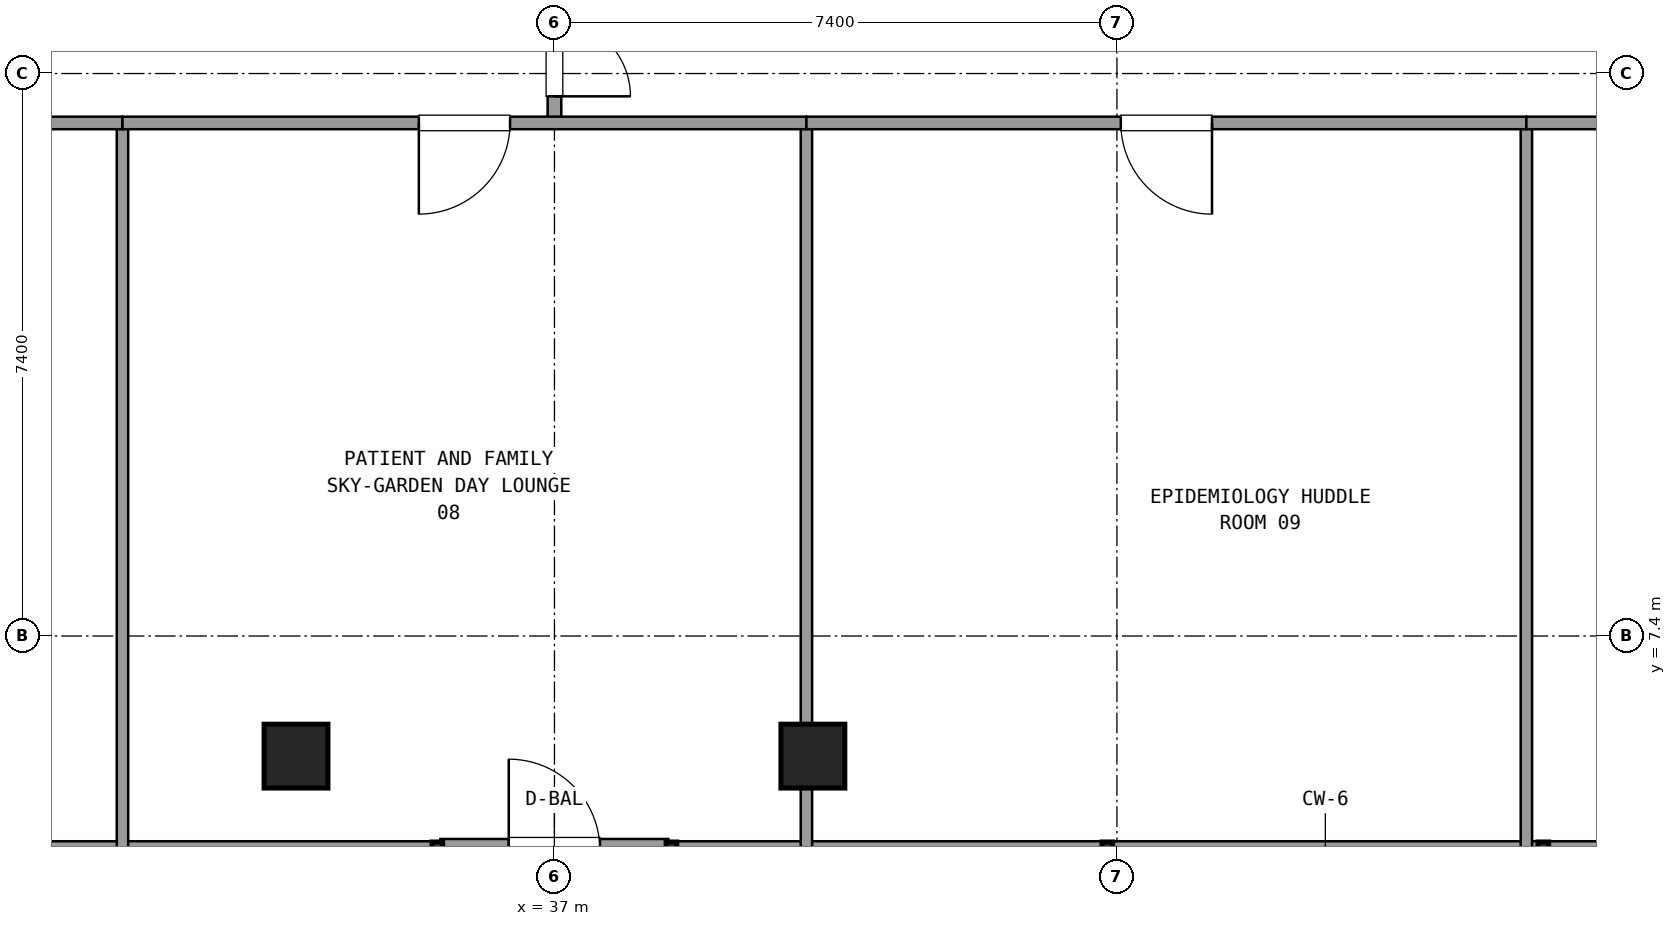
"""IFC4 building model, lengths in metres.
Left out: names, types, materials, properties, quantities, classifications, styles, units other than length and angle.
Written with IfcOpenShell. Run it as: python <this file> out.ifc"""

import sys

from ifc_helpers import new_model, si_unit, direction, frame, frame_2d, origin, origin_2d, place, context, subcontext, project, spatial, rectangle, extrude, element, fill, save


model = new_model("IFC4")
c1 = context("Model", 3, precision=1e-05, world=origin(), true_north=direction((0.0, 1.0)))
c2 = subcontext(c1, "Body", "Model", "MODEL_VIEW")
j1 = project(units=[si_unit("LENGTHUNIT", "METRE"), si_unit("PLANEANGLEUNIT", "RADIAN")], contexts=[c1])
p1 = place(None, origin())
s1 = spatial("IfcSite", under=j1, at=p1, CompositionType="ELEMENT")
p2 = place(p1, origin())
s2 = spatial("IfcBuilding", under=s1, at=p2, CompositionType="ELEMENT")
p3 = place(p2, frame((0.0, 0.0, 264.42)))
s3 = spatial("IfcBuildingStorey", under=s2, at=p3, CompositionType="ELEMENT", Elevation=264.42)
for number, where, z_axis, x_axis in (
    (1, (33.6, 5.82, 0.0), (0.0, 0.0, 1.0), (1.0, 0.0, 0.0)),
    (2, (40.4, 5.82, 0.0), (0.0, 0.0, 1.0), (1.0, 0.0, 0.0)),
):
    element("IfcColumn", number, at=place(p3, frame(where, z_axis=z_axis, x_axis=x_axis)), inside=s3, PredefinedType="COLUMN", context=c2, shape_type="SweptSolid", body=[
        extrude(rectangle(XDim=0.84, YDim=0.84, at=origin_2d()), origin(), (0.0, 0.0, 1.0), 3.6),
    ])
p4 = place(p3, frame((35.499, 4.58, 0.0), z_axis=(0.0, 0.0, 1.0), x_axis=(1.0, 0.0, 0.0)))
e3 = element("IfcWall", 3, at=p4, inside=s3, PredefinedType="SOLIDWALL", context=c2, shape_type="SweptSolid", body=[
    extrude(rectangle(XDim=3.0, YDim=0.3, at=frame_2d((1.5, 0.0))), origin(), (0.0, 0.0, 1.0), 2.69),
])
p5 = place(p4, frame((0.9, 0.0, 0.0)))
e4 = element("IfcOpeningElement", 4, at=p5, cuts=e3, PredefinedType="OPENING", context=c2, shape_type="SweptSolid", body=[
    extrude(rectangle(XDim=1.2, YDim=2.2, at=frame_2d((0.6, 1.1))), frame((0.0, 0.16, 0.0), z_axis=(0.0, -1.0, 0.0), x_axis=(1.0, 0.0, 0.0)), (0.0, 0.0, 1.0), 0.32),
])
p6 = place(p3, frame((18.255, 4.58, 0.0), z_axis=(0.0, 0.0, 1.0), x_axis=(1.0, 0.0, 0.0)))
e5 = element("IfcWall", 5, at=p6, inside=s3, PredefinedType="SOLIDWALL", context=c2, shape_type="SweptSolid", body=[
    extrude(rectangle(XDim=17.204, YDim=0.24, at=frame_2d((8.602, 0.0))), origin(), (0.0, 0.0, 1.0), 0.85),
])
p7 = place(p3, frame((38.539, 4.58, 0.0), z_axis=(0.0, 0.0, 1.0), x_axis=(1.0, 0.0, 0.0)))
e6 = element("IfcWall", 6, at=p7, inside=s3, PredefinedType="SOLIDWALL", context=c2, shape_type="SweptSolid", body=[
    extrude(rectangle(XDim=17.206, YDim=0.24, at=frame_2d((8.603, 0.0))), origin(), (0.0, 0.0, 1.0), 0.85),
])
p8 = place(p3, frame((37.0, 14.15, 0.0), z_axis=(0.0, 0.0, 1.0), x_axis=(0.0, 1.0, 0.0)))
e7 = element("IfcWall", 7, at=p8, inside=s3, PredefinedType="PARTITIONING", context=c2, shape_type="SweptSolid", body=[
    extrude(rectangle(XDim=2.7, YDim=0.18, at=frame_2d((1.35, 0.0))), origin(), (0.0, 0.0, 1.0), 2.61),
])
p9 = place(p8, frame((0.35, 0.0, 0.0)))
e8 = element("IfcOpeningElement", 8, at=p9, cuts=e7, PredefinedType="OPENING", context=c2, shape_type="SweptSolid", body=[
    extrude(rectangle(XDim=2.0, YDim=2.2, at=frame_2d((1.0, 1.1))), frame((0.0, 0.1, 0.0), z_axis=(0.0, -1.0, 0.0), x_axis=(1.0, 0.0, 0.0)), (0.0, 0.0, 1.0), 0.2),
])
p10 = place(p3, frame((31.317, 14.15, 0.0), z_axis=(0.0, 0.0, 1.0), x_axis=(0.0, -1.0, 0.0)))
e9 = element("IfcWall", 9, at=p10, inside=s3, PredefinedType="PARTITIONING", context=c2, shape_type="SweptSolid", body=[
    extrude(rectangle(XDim=9.55, YDim=0.15, at=frame_2d((4.775, 0.0))), origin(), (0.0, 0.0, 1.0), 2.61),
])
p11 = place(p3, frame((23.65, 14.15, 0.0), z_axis=(0.0, 0.0, 1.0), x_axis=(1.0, 0.0, 0.0)))
e10 = element("IfcWall", 10, at=p11, inside=s3, PredefinedType="PARTITIONING", context=c2, shape_type="SweptSolid", body=[
    extrude(rectangle(XDim=7.667, YDim=0.165, at=frame_2d((3.833, 0.0))), origin(), (0.0, 0.0, 1.0), 2.61),
])
p12 = place(p11, frame((3.234, 0.0, 0.0)))
e11 = element("IfcOpeningElement", 11, at=p12, cuts=e10, PredefinedType="OPENING", context=c2, shape_type="SweptSolid", body=[
    extrude(rectangle(XDim=1.2, YDim=2.15, at=frame_2d((0.6, 1.075))), frame((0.0, 0.093, 0.0), z_axis=(0.0, -1.0, 0.0), x_axis=(1.0, 0.0, 0.0)), (0.0, 0.0, 1.0), 0.185),
])
p13 = place(p3, frame((40.315, 14.15, 0.0), z_axis=(0.0, 0.0, 1.0), x_axis=(0.0, -1.0, 0.0)))
e12 = element("IfcWall", 12, at=p13, inside=s3, PredefinedType="PARTITIONING", context=c2, shape_type="SweptSolid", body=[
    extrude(rectangle(XDim=9.55, YDim=0.15, at=frame_2d((4.775, 0.0))), origin(), (0.0, 0.0, 1.0), 2.61),
])
p14 = place(p3, frame((31.317, 14.15, 0.0), z_axis=(0.0, 0.0, 1.0), x_axis=(1.0, 0.0, 0.0)))
e13 = element("IfcWall", 13, at=p14, inside=s3, PredefinedType="PARTITIONING", context=c2, shape_type="SweptSolid", body=[
    extrude(rectangle(XDim=8.998, YDim=0.165, at=frame_2d((4.499, 0.0))), origin(), (0.0, 0.0, 1.0), 2.61),
])
p15 = place(p14, frame((3.899, 0.0, 0.0)))
e14 = element("IfcOpeningElement", 14, at=p15, cuts=e13, PredefinedType="OPENING", context=c2, shape_type="SweptSolid", body=[
    extrude(rectangle(XDim=1.2, YDim=2.15, at=frame_2d((0.6, 1.075))), frame((0.0, 0.093, 0.0), z_axis=(0.0, -1.0, 0.0), x_axis=(1.0, 0.0, 0.0)), (0.0, 0.0, 1.0), 0.185),
])
p16 = place(p3, frame((49.787, 14.15, 0.0), z_axis=(0.0, 0.0, 1.0), x_axis=(0.0, -1.0, 0.0)))
e15 = element("IfcWall", 15, at=p16, inside=s3, PredefinedType="PARTITIONING", context=c2, shape_type="SweptSolid", body=[
    extrude(rectangle(XDim=9.55, YDim=0.15, at=frame_2d((4.775, 0.0))), origin(), (0.0, 0.0, 1.0), 2.61),
])
p17 = place(p3, frame((40.315, 14.15, 0.0), z_axis=(0.0, 0.0, 1.0), x_axis=(1.0, 0.0, 0.0)))
e16 = element("IfcWall", 16, at=p17, inside=s3, PredefinedType="PARTITIONING", context=c2, shape_type="SweptSolid", body=[
    extrude(rectangle(XDim=9.472, YDim=0.165, at=frame_2d((4.736, 0.0))), origin(), (0.0, 0.0, 1.0), 2.61),
])
p18 = place(p17, frame((4.136, 0.0, 0.0)))
e17 = element("IfcOpeningElement", 17, at=p18, cuts=e16, PredefinedType="OPENING", context=c2, shape_type="SweptSolid", body=[
    extrude(rectangle(XDim=1.2, YDim=2.15, at=frame_2d((0.6, 1.075))), frame((0.0, 0.093, 0.0), z_axis=(0.0, -1.0, 0.0), x_axis=(1.0, 0.0, 0.0)), (0.0, 0.0, 1.0), 0.185),
])
p19 = place(p3, frame((49.787, 14.15, 0.0), z_axis=(0.0, 0.0, 1.0), x_axis=(1.0, 0.0, 0.0)))
e18 = element("IfcWall", 18, at=p19, inside=s3, PredefinedType="PARTITIONING", context=c2, shape_type="SweptSolid", body=[
    extrude(rectangle(XDim=3.113, YDim=0.165, at=frame_2d((1.556, 0.0))), origin(), (0.0, 0.0, 1.0), 2.61),
])
p20 = place(p19, frame((0.956, 0.0, 0.0)))
e19 = element("IfcOpeningElement", 19, at=p20, cuts=e18, PredefinedType="OPENING", context=c2, shape_type="SweptSolid", body=[
    extrude(rectangle(XDim=1.2, YDim=2.15, at=frame_2d((0.6, 1.075))), frame((0.0, 0.093, 0.0), z_axis=(0.0, -1.0, 0.0), x_axis=(1.0, 0.0, 0.0)), (0.0, 0.0, 1.0), 0.185),
])
p21 = place(p9, frame((2.0, 0.0, 0.0), z_axis=(0.0, 0.0, 1.0), x_axis=(-1.0, 0.0, 0.0)))
e20 = element("IfcDoor", 20, at=p21, inside=s3, OperationType="DOUBLE_DOOR_SINGLE_SWING", PredefinedType="DOOR", context=c2, shape_type="SweptSolid", body=[
    extrude(rectangle(XDim=2.0, YDim=2.2, at=frame_2d((1.0, 1.1))), frame((0.0, 0.025, 0.0), z_axis=(0.0, -1.0, 0.0), x_axis=(1.0, 0.0, 0.0)), (0.0, 0.0, 1.0), 0.05),
])
fill(e8, e20)
p22 = place(p15, frame((1.2, 0.0, 0.0), z_axis=(0.0, 0.0, 1.0), x_axis=(-1.0, 0.0, 0.0)))
e21 = element("IfcDoor", 21, at=p22, inside=s3, OperationType="SINGLE_SWING_LEFT", PredefinedType="DOOR", context=c2, shape_type="SweptSolid", body=[
    extrude(rectangle(XDim=1.2, YDim=2.15, at=frame_2d((0.6, 1.075))), frame((0.0, 0.025, 0.0), z_axis=(0.0, -1.0, 0.0), x_axis=(1.0, 0.0, 0.0)), (0.0, 0.0, 1.0), 0.05),
])
fill(e14, e21)
p23 = place(p18, frame((1.2, 0.0, 0.0), z_axis=(0.0, 0.0, 1.0), x_axis=(-1.0, 0.0, 0.0)))
e22 = element("IfcDoor", 22, at=p23, inside=s3, OperationType="SINGLE_SWING_RIGHT", PredefinedType="DOOR", context=c2, shape_type="SweptSolid", body=[
    extrude(rectangle(XDim=1.2, YDim=2.15, at=frame_2d((0.6, 1.075))), frame((0.0, 0.025, 0.0), z_axis=(0.0, -1.0, 0.0), x_axis=(1.0, 0.0, 0.0)), (0.0, 0.0, 1.0), 0.05),
])
fill(e17, e22)
save(model, sys.argv[1])
